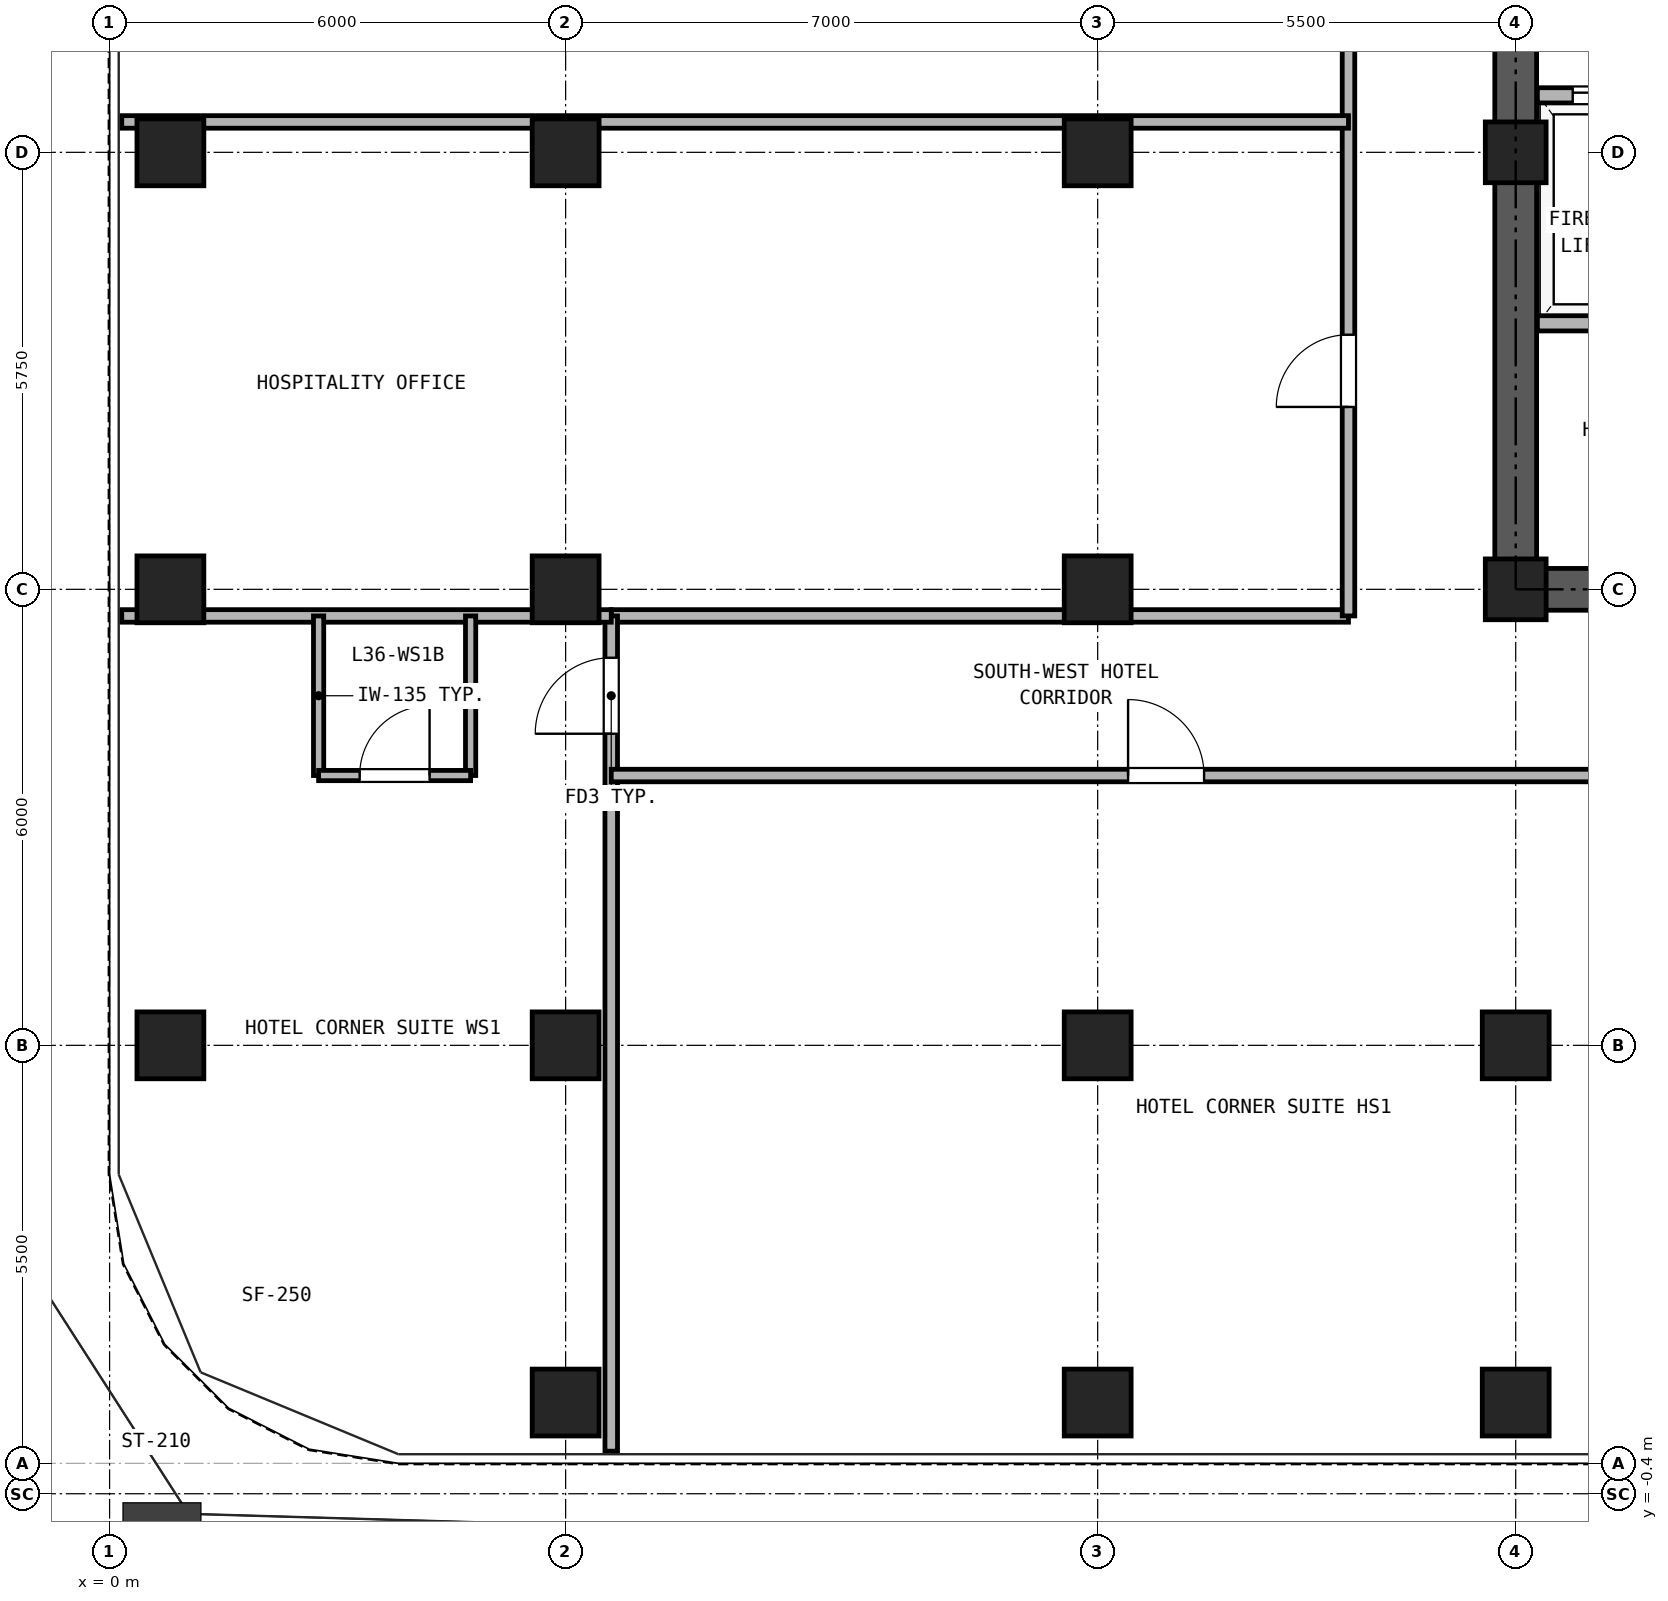
"""IFC4 building model, lengths in metres.
Left out: names, types, materials, properties, quantities, classifications, styles, units other than length and angle.
Written with IfcOpenShell. Run it as: python <this file> out.ifc"""

import sys

from ifc_helpers import new_model, si_unit, direction, frame, frame_2d, origin, origin_2d, place, context, subcontext, project, spatial, rectangle, hollow_rectangle, extrude, source, transform, mapped, element, fill, save


model = new_model("IFC4")
c1 = context("Model", 3, precision=1e-05, world=origin(), true_north=direction((0.0, 1.0)))
c2 = subcontext(c1, "Body", "Model", "MODEL_VIEW")
j1 = project(units=[si_unit("LENGTHUNIT", "METRE"), si_unit("PLANEANGLEUNIT", "RADIAN")], contexts=[c1])
p1 = place(None, origin())
s1 = spatial("IfcSite", under=j1, at=p1, CompositionType="ELEMENT")
p2 = place(p1, origin())
s2 = spatial("IfcBuilding", under=s1, at=p2, CompositionType="ELEMENT")
p3 = place(p2, frame((0.0, 0.0, 131.1)))
s3 = spatial("IfcBuildingStorey", under=s2, at=p3, CompositionType="ELEMENT", Elevation=131.1)
m1 = source(origin(), c2, "Body", "SweptSolid", [
    extrude(hollow_rectangle(XDim=0.88, YDim=0.88, WallThickness=0.05, at=origin_2d()), origin(), (0.0, 0.0, 1.0), 2.95),
])
for number, where, z_axis, x_axis in (
    (1, (6.0, 0.8, 0.0), (0.0, 0.0, 1.0), (1.0, 0.0, 0.0)),
    (2, (13.0, 0.8, 0.0), (0.0, 0.0, 1.0), (1.0, 0.0, 0.0)),
    (3, (18.5, 0.8, 0.0), (0.0, 0.0, 1.0), (1.0, 0.0, 0.0)),
    (4, (0.8, 5.5, 0.0), (0.0, 0.0, 1.0), (1.0, 0.0, 0.0)),
    (5, (0.8, 11.5, 0.0), (0.0, 0.0, 1.0), (1.0, 0.0, 0.0)),
    (6, (0.8, 17.25, 0.0), (0.0, 0.0, 1.0), (1.0, 0.0, 0.0)),
    (7, (6.0, 5.5, 0.0), (0.0, 0.0, 1.0), (1.0, 0.0, 0.0)),
    (8, (6.0, 11.5, 0.0), (0.0, 0.0, 1.0), (1.0, 0.0, 0.0)),
    (9, (6.0, 17.25, 0.0), (0.0, 0.0, 1.0), (1.0, 0.0, 0.0)),
    (10, (13.0, 5.5, 0.0), (0.0, 0.0, 1.0), (1.0, 0.0, 0.0)),
    (11, (13.0, 11.5, 0.0), (0.0, 0.0, 1.0), (1.0, 0.0, 0.0)),
    (12, (13.0, 17.25, 0.0), (0.0, 0.0, 1.0), (1.0, 0.0, 0.0)),
    (13, (18.5, 5.5, 0.0), (0.0, 0.0, 1.0), (1.0, 0.0, 0.0)),
):
    element("IfcColumn", number, at=place(p3, frame(where, z_axis=z_axis, x_axis=x_axis)), inside=s3, PredefinedType="COLUMN", context=c2, shape_type="MappedRepresentation", body=[
        mapped(m1, transform((0.0, 0.0, 0.0), x_axis=(1.0, 0.0, 0.0), y_axis=(0.0, 1.0, 0.0), z_axis=(0.0, 0.0, 1.0), scale=1.0)),
    ])
m2 = source(origin(), c2, "Body", "SweptSolid", [
    extrude(hollow_rectangle(XDim=0.8, YDim=0.8, WallThickness=0.045, at=origin_2d()), origin(), (0.0, 0.0, 1.0), 2.95),
])
for number, where, z_axis, x_axis in (
    (14, (18.5, 11.5, 0.0), (0.0, 0.0, 1.0), (1.0, 0.0, 0.0)),
    (15, (18.5, 17.25, 0.0), (0.0, 0.0, 1.0), (1.0, 0.0, 0.0)),
):
    element("IfcColumn", number, at=place(p3, frame(where, z_axis=z_axis, x_axis=x_axis)), inside=s3, PredefinedType="COLUMN", context=c2, shape_type="MappedRepresentation", body=[
        mapped(m2, transform((0.0, 0.0, 0.0), x_axis=(1.0, 0.0, 0.0), y_axis=(0.0, 1.0, 0.0), z_axis=(0.0, 0.0, 1.0), scale=1.0)),
    ])
p4 = place(p3, frame((18.225, 11.5, 0.0), z_axis=(0.0, 0.0, 1.0), x_axis=(1.0, 0.0, 0.0)))
e16 = element("IfcWall", 16, at=p4, inside=s3, PredefinedType="SHEAR", context=c2, shape_type="SweptSolid", body=[
    extrude(rectangle(XDim=10.55, YDim=0.55, at=frame_2d((5.275, 0.0))), origin(), (0.0, 0.0, 1.0), 2.95),
])
p5 = place(p4, frame((2.375, 0.0, 0.0)))
e17 = element("IfcOpeningElement", 17, at=p5, cuts=e16, PredefinedType="OPENING", context=c2, shape_type="SweptSolid", body=[
    extrude(rectangle(XDim=0.95, YDim=2.15, at=frame_2d((0.475, 1.075))), frame((0.0, 0.285, 0.0), z_axis=(0.0, -1.0, 0.0), x_axis=(1.0, 0.0, 0.0)), (0.0, 0.0, 1.0), 0.57),
])
p6 = place(p4, frame((5.875, 0.0, 0.0)))
e18 = element("IfcOpeningElement", 18, at=p6, cuts=e16, PredefinedType="OPENING", context=c2, shape_type="SweptSolid", body=[
    extrude(rectangle(XDim=1.1, YDim=2.25, at=frame_2d((0.55, 1.125))), frame((0.0, 0.285, 0.0), z_axis=(0.0, -1.0, 0.0), x_axis=(1.0, 0.0, 0.0)), (0.0, 0.0, 1.0), 0.57),
])
p7 = place(p4, frame((8.275, 0.0, 0.0)))
e19 = element("IfcOpeningElement", 19, at=p7, cuts=e16, PredefinedType="OPENING", context=c2, shape_type="SweptSolid", body=[
    extrude(rectangle(XDim=1.1, YDim=2.25, at=frame_2d((0.55, 1.125))), frame((0.0, 0.285, 0.0), z_axis=(0.0, -1.0, 0.0), x_axis=(1.0, 0.0, 0.0)), (0.0, 0.0, 1.0), 0.57),
])
p8 = place(p3, frame((18.5, 11.775, 0.0), z_axis=(0.0, 0.0, 1.0), x_axis=(0.0, 1.0, 0.0)))
e20 = element("IfcWall", 20, at=p8, inside=s3, PredefinedType="SHEAR", context=c2, shape_type="SweptSolid", body=[
    extrude(rectangle(XDim=16.7, YDim=0.55, at=frame_2d((8.35, 0.0))), origin(), (0.0, 0.0, 1.0), 2.95),
])
p9 = place(p8, frame((7.375, 0.0, 0.0)))
e21 = element("IfcOpeningElement", 21, at=p9, cuts=e20, PredefinedType="OPENING", context=c2, shape_type="SweptSolid", body=[
    extrude(rectangle(XDim=1.15, YDim=2.2, at=frame_2d((0.575, 1.1))), frame((0.0, 0.285, 0.0), z_axis=(0.0, -1.0, 0.0), x_axis=(1.0, 0.0, 0.0)), (0.0, 0.0, 1.0), 0.57),
])
p10 = place(p3, frame((18.785, 18.0, 0.0), z_axis=(0.0, 0.0, 1.0), x_axis=(1.0, 0.0, 0.0)))
e22 = element("IfcWall", 22, at=p10, inside=s3, PredefinedType="PARTITIONING", context=c2, shape_type="SweptSolid", body=[
    extrude(rectangle(XDim=9.43, YDim=0.2, at=frame_2d((4.715, 0.0))), origin(), (0.0, 0.0, 1.0), 2.95),
])
p11 = place(p10, frame((0.465, 0.0, 0.0)))
e23 = element("IfcOpeningElement", 23, at=p11, cuts=e22, PredefinedType="OPENING", context=c2, shape_type="SweptSolid", body=[
    extrude(rectangle(XDim=1.3, YDim=2.3, at=frame_2d((0.65, 1.15))), frame((0.0, 0.11, 0.0), z_axis=(0.0, -1.0, 0.0), x_axis=(1.0, 0.0, 0.0)), (0.0, 0.0, 1.0), 0.22),
])
p12 = place(p10, frame((2.565, 0.0, 0.0)))
e24 = element("IfcOpeningElement", 24, at=p12, cuts=e22, PredefinedType="OPENING", context=c2, shape_type="SweptSolid", body=[
    extrude(rectangle(XDim=1.3, YDim=2.3, at=frame_2d((0.65, 1.15))), frame((0.0, 0.11, 0.0), z_axis=(0.0, -1.0, 0.0), x_axis=(1.0, 0.0, 0.0)), (0.0, 0.0, 1.0), 0.22),
])
p13 = place(p10, frame((4.985, 0.0, 0.0)))
e25 = element("IfcOpeningElement", 25, at=p13, cuts=e22, PredefinedType="OPENING", context=c2, shape_type="SweptSolid", body=[
    extrude(rectangle(XDim=0.9, YDim=2.05, at=frame_2d((0.45, 1.025))), frame((0.0, 0.11, 0.0), z_axis=(0.0, -1.0, 0.0), x_axis=(1.0, 0.0, 0.0)), (0.0, 0.0, 1.0), 0.22),
])
p14 = place(p10, frame((8.115, 0.0, 0.0)))
e26 = element("IfcOpeningElement", 26, at=p14, cuts=e22, PredefinedType="OPENING", context=c2, shape_type="SweptSolid", body=[
    extrude(rectangle(XDim=0.9, YDim=2.05, at=frame_2d((0.45, 1.025))), frame((0.0, 0.11, 0.0), z_axis=(0.0, -1.0, 0.0), x_axis=(1.0, 0.0, 0.0)), (0.0, 0.0, 1.0), 0.22),
])
p15 = place(p3, frame((18.785, 15.0, 0.0), z_axis=(0.0, 0.0, 1.0), x_axis=(1.0, 0.0, 0.0)))
e27 = element("IfcWall", 27, at=p15, inside=s3, PredefinedType="PARTITIONING", context=c2, shape_type="SweptSolid", body=[
    extrude(rectangle(XDim=9.43, YDim=0.2, at=frame_2d((4.715, 0.0))), origin(), (0.0, 0.0, 1.0), 2.95),
])
p16 = place(p3, frame((6.6, 11.15, 0.0), z_axis=(0.0, 0.0, 1.0), x_axis=(1.0, 0.0, 0.0)))
e28 = element("IfcWall", 28, at=p16, inside=s3, PredefinedType="PARTITIONING", context=c2, shape_type="SweptSolid", body=[
    extrude(rectangle(XDim=9.7, YDim=0.165, at=frame_2d((4.85, 0.0))), origin(), (0.0, 0.0, 1.0), 2.95),
])
p17 = place(p3, frame((16.3, 11.15, 0.0), z_axis=(0.0, 0.0, 1.0), x_axis=(0.0, 1.0, 0.0)))
e29 = element("IfcWall", 29, at=p17, inside=s3, PredefinedType="PARTITIONING", context=c2, shape_type="SweptSolid", body=[
    extrude(rectangle(XDim=18.7, YDim=0.165, at=frame_2d((9.35, 0.0))), origin(), (0.0, 0.0, 1.0), 2.95),
])
p18 = place(p17, frame((2.75, 0.0, 0.0)))
e30 = element("IfcOpeningElement", 30, at=p18, cuts=e29, PredefinedType="OPENING", context=c2, shape_type="SweptSolid", body=[
    extrude(rectangle(XDim=0.95, YDim=2.15, at=frame_2d((0.475, 1.075))), frame((0.0, 0.093, 0.0), z_axis=(0.0, -1.0, 0.0), x_axis=(1.0, 0.0, 0.0)), (0.0, 0.0, 1.0), 0.185),
])
p19 = place(p17, frame((12.1, 0.0, 0.0)))
e31 = element("IfcOpeningElement", 31, at=p19, cuts=e29, PredefinedType="OPENING", context=c2, shape_type="SweptSolid", body=[
    extrude(rectangle(XDim=0.95, YDim=2.15, at=frame_2d((0.475, 1.075))), frame((0.0, 0.093, 0.0), z_axis=(0.0, -1.0, 0.0), x_axis=(1.0, 0.0, 0.0)), (0.0, 0.0, 1.0), 0.185),
])
p20 = place(p3, frame((6.6, 0.16, 0.0), z_axis=(0.0, 0.0, 1.0), x_axis=(0.0, 1.0, 0.0)))
e32 = element("IfcWall", 32, at=p20, inside=s3, PredefinedType="PARTITIONING", context=c2, shape_type="SweptSolid", body=[
    extrude(rectangle(XDim=10.99, YDim=0.165, at=frame_2d((5.495, 0.0))), origin(), (0.0, 0.0, 1.0), 2.95),
])
p21 = place(p20, frame((9.44, 0.0, 0.0)))
e33 = element("IfcOpeningElement", 33, at=p21, cuts=e32, PredefinedType="OPENING", context=c2, shape_type="SweptSolid", body=[
    extrude(rectangle(XDim=1.0, YDim=2.15, at=frame_2d((0.5, 1.075))), frame((0.0, 0.093, 0.0), z_axis=(0.0, -1.0, 0.0), x_axis=(1.0, 0.0, 0.0)), (0.0, 0.0, 1.0), 0.185),
])
p22 = place(p3, frame((0.16, 11.15, 0.0), z_axis=(0.0, 0.0, 1.0), x_axis=(1.0, 0.0, 0.0)))
e34 = element("IfcWall", 34, at=p22, inside=s3, PredefinedType="PARTITIONING", context=c2, shape_type="SweptSolid", body=[
    extrude(rectangle(XDim=6.44, YDim=0.165, at=frame_2d((3.22, 0.0))), origin(), (0.0, 0.0, 1.0), 2.95),
])
for number, where, z_axis, x_axis in (
    (35, (2.75, 9.05, 0.0), (0.0, 0.0, 1.0), (0.0, 1.0, 0.0)),
    (36, (4.75, 9.05, 0.0), (0.0, 0.0, 1.0), (0.0, 1.0, 0.0)),
):
    element("IfcWall", number, at=place(p3, frame(where, z_axis=z_axis, x_axis=x_axis)), inside=s3, PredefinedType="PARTITIONING", context=c2, shape_type="SweptSolid", body=[
        extrude(rectangle(XDim=2.1, YDim=0.135, at=frame_2d((1.05, 0.0))), origin(), (0.0, 0.0, 1.0), 2.95),
    ])
p23 = place(p3, frame((2.75, 9.05, 0.0), z_axis=(0.0, 0.0, 1.0), x_axis=(1.0, 0.0, 0.0)))
e37 = element("IfcWall", 37, at=p23, inside=s3, PredefinedType="PARTITIONING", context=c2, shape_type="SweptSolid", body=[
    extrude(rectangle(XDim=2.0, YDim=0.135, at=frame_2d((1.0, 0.0))), origin(), (0.0, 0.0, 1.0), 2.95),
])
p24 = place(p23, frame((0.54, 0.0, 0.0)))
e38 = element("IfcOpeningElement", 38, at=p24, cuts=e37, PredefinedType="OPENING", context=c2, shape_type="SweptSolid", body=[
    extrude(rectangle(XDim=0.92, YDim=2.1, at=frame_2d((0.46, 1.05))), frame((0.0, 0.077, 0.0), z_axis=(0.0, -1.0, 0.0), x_axis=(1.0, 0.0, 0.0)), (0.0, 0.0, 1.0), 0.155),
])
p25 = place(p3, frame((6.6, 9.05, 0.0), z_axis=(0.0, 0.0, 1.0), x_axis=(1.0, 0.0, 0.0)))
e39 = element("IfcWall", 39, at=p25, inside=s3, PredefinedType="PARTITIONING", context=c2, shape_type="SweptSolid", body=[
    extrude(rectangle(XDim=14.6, YDim=0.165, at=frame_2d((7.3, 0.0))), origin(), (0.0, 0.0, 1.0), 2.95),
])
p26 = place(p25, frame((6.8, 0.0, 0.0)))
e40 = element("IfcOpeningElement", 40, at=p26, cuts=e39, PredefinedType="OPENING", context=c2, shape_type="SweptSolid", body=[
    extrude(rectangle(XDim=1.0, YDim=2.15, at=frame_2d((0.5, 1.075))), frame((0.0, 0.093, 0.0), z_axis=(0.0, -1.0, 0.0), x_axis=(1.0, 0.0, 0.0)), (0.0, 0.0, 1.0), 0.185),
])
p27 = place(p3, frame((0.16, 17.65, 0.0), z_axis=(0.0, 0.0, 1.0), x_axis=(1.0, 0.0, 0.0)))
e41 = element("IfcWall", 41, at=p27, inside=s3, PredefinedType="PARTITIONING", context=c2, shape_type="SweptSolid", body=[
    extrude(rectangle(XDim=16.14, YDim=0.165, at=frame_2d((8.07, 0.0))), origin(), (0.0, 0.0, 1.0), 2.95),
])
p28 = place(p11, origin())
e42 = element("IfcDoor", 42, at=p28, inside=s3, OperationType="DOUBLE_DOOR_SLIDING", PredefinedType="DOOR", context=c2, shape_type="SweptSolid", body=[
    extrude(rectangle(XDim=1.3, YDim=2.3, at=frame_2d((0.65, 1.15))), frame((0.0, 0.025, 0.0), z_axis=(0.0, -1.0, 0.0), x_axis=(1.0, 0.0, 0.0)), (0.0, 0.0, 1.0), 0.05),
])
fill(e23, e42)
p29 = place(p24, origin())
e43 = element("IfcDoor", 43, at=p29, inside=s3, OperationType="SINGLE_SWING_RIGHT", PredefinedType="DOOR", context=c2, shape_type="SweptSolid", body=[
    extrude(rectangle(XDim=0.92, YDim=2.1, at=frame_2d((0.46, 1.05))), frame((0.0, 0.025, 0.0), z_axis=(0.0, -1.0, 0.0), x_axis=(1.0, 0.0, 0.0)), (0.0, 0.0, 1.0), 0.05),
])
fill(e38, e43)
p30 = place(p21, origin())
e44 = element("IfcDoor", 44, at=p30, inside=s3, OperationType="SINGLE_SWING_LEFT", PredefinedType="DOOR", context=c2, shape_type="SweptSolid", body=[
    extrude(rectangle(XDim=1.0, YDim=2.15, at=frame_2d((0.5, 1.075))), frame((0.0, 0.025, 0.0), z_axis=(0.0, -1.0, 0.0), x_axis=(1.0, 0.0, 0.0)), (0.0, 0.0, 1.0), 0.05),
])
fill(e33, e44)
p31 = place(p26, frame((1.0, 0.0, 0.0), z_axis=(0.0, 0.0, 1.0), x_axis=(-1.0, 0.0, 0.0)))
e45 = element("IfcDoor", 45, at=p31, inside=s3, OperationType="SINGLE_SWING_LEFT", PredefinedType="DOOR", context=c2, shape_type="SweptSolid", body=[
    extrude(rectangle(XDim=1.0, YDim=2.15, at=frame_2d((0.5, 1.075))), frame((0.0, 0.025, 0.0), z_axis=(0.0, -1.0, 0.0), x_axis=(1.0, 0.0, 0.0)), (0.0, 0.0, 1.0), 0.05),
])
fill(e40, e45)
p32 = place(p18, frame((0.95, 0.0, 0.0), z_axis=(0.0, 0.0, 1.0), x_axis=(-1.0, 0.0, 0.0)))
e46 = element("IfcDoor", 46, at=p32, inside=s3, OperationType="SINGLE_SWING_LEFT", PredefinedType="DOOR", context=c2, shape_type="SweptSolid", body=[
    extrude(rectangle(XDim=0.95, YDim=2.15, at=frame_2d((0.475, 1.075))), frame((0.0, 0.025, 0.0), z_axis=(0.0, -1.0, 0.0), x_axis=(1.0, 0.0, 0.0)), (0.0, 0.0, 1.0), 0.05),
])
fill(e30, e46)
save(model, sys.argv[1])
